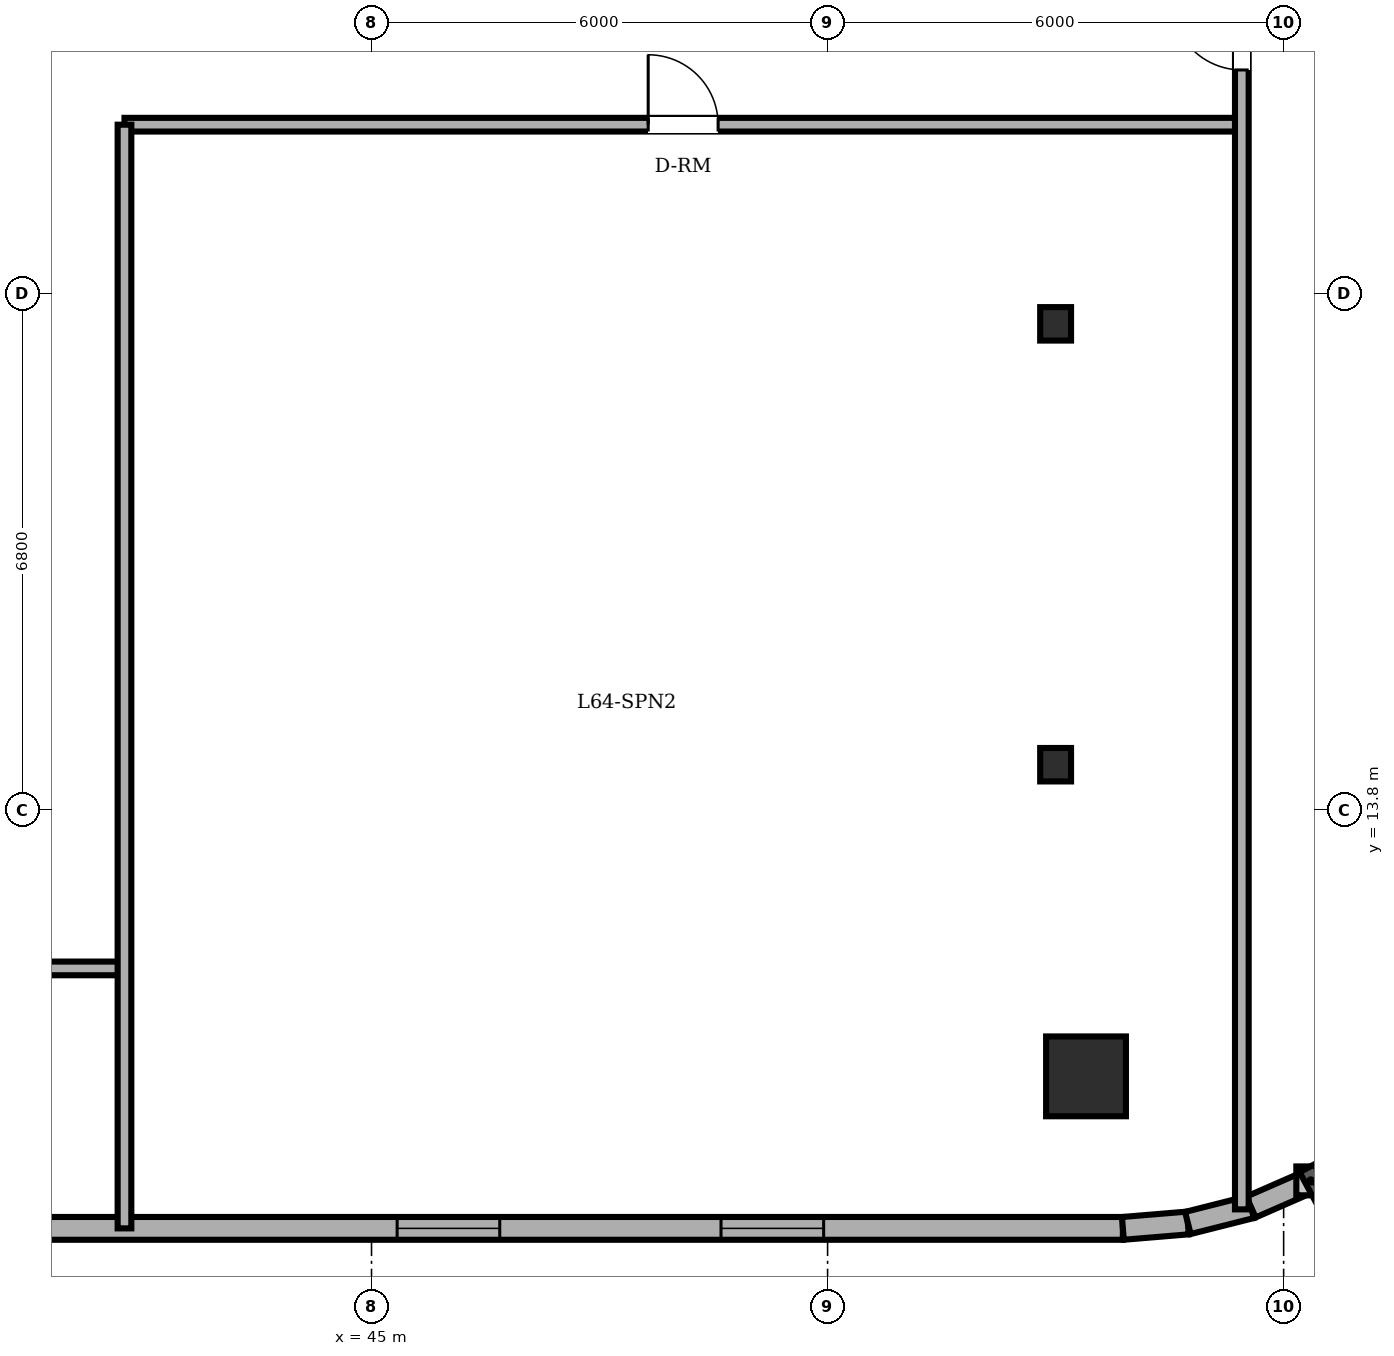
"""IFC4 building model, lengths in metres.
Left out: names, types, materials, properties, quantities, classifications, styles, units other than length and angle.
Written with IfcOpenShell. Run it as: python <this file> out.ifc"""

import sys

from ifc_helpers import new_model, si_unit, direction, frame, frame_2d, origin, origin_2d, place, context, subcontext, project, spatial, rectangle, circle, i_section, extrude, element, fill, save


model = new_model("IFC4")
c1 = context("Model", 3, precision=1e-05, world=origin(), true_north=direction((0.0, 1.0)))
c2 = subcontext(c1, "Body", "Model", "MODEL_VIEW")
j1 = project(units=[si_unit("LENGTHUNIT", "METRE"), si_unit("PLANEANGLEUNIT", "RADIAN")], contexts=[c1])
p1 = place(None, origin())
s1 = spatial("IfcSite", under=j1, at=p1, CompositionType="ELEMENT")
p2 = place(p1, origin())
s2 = spatial("IfcBuilding", under=s1, at=p2, CompositionType="ELEMENT")
p3 = place(p2, frame((0.0, 0.0, 244.5)))
s3 = spatial("IfcBuildingStorey", under=s2, at=p3, CompositionType="ELEMENT", Elevation=244.5)
p4 = place(p3, frame((54.4, 10.3, 0.0), z_axis=(0.0, 0.0, 1.0), x_axis=(1.0, 0.0, 0.0)))
e1 = element("IfcColumn", 1, at=p4, inside=s3, PredefinedType="COLUMN", context=c2, shape_type="SweptSolid", body=[
    extrude(circle(Radius=0.525, at=origin_2d()), origin(), (0.0, 0.0, 1.0), 3.6),
])
for number, where, z_axis, x_axis in (
    (2, (54.0, 14.4, 0.0), (0.0, 0.0, 1.0), (1.0, 0.0, 0.0)),
    (3, (54.0, 20.2, 0.0), (0.0, 0.0, 1.0), (1.0, 0.0, 0.0)),
):
    element("IfcColumn", number, at=place(p3, frame(where, z_axis=z_axis, x_axis=x_axis)), inside=s3, PredefinedType="COLUMN", context=c2, shape_type="SweptSolid", body=[
        extrude(i_section(OverallWidth=0.406, OverallDepth=0.44, WebThickness=0.024, FlangeThickness=0.039, FilletRadius=0.015, at=origin_2d()), origin(), (0.0, 0.0, 1.0), 3.6),
    ])
p5 = place(p3, frame((22.4, 8.3, 0.0), z_axis=(0.0, 0.0, 1.0), x_axis=(1.0, 0.0, 0.0)))
e4 = element("IfcWall", 4, at=p5, inside=s3, PredefinedType="SOLIDWALL", context=c2, shape_type="SweptSolid", body=[
    extrude(rectangle(XDim=32.485, YDim=0.3, at=frame_2d((16.243, 0.0))), origin(), (0.0, 0.0, 1.0), 3.36),
])
p6 = place(p5, frame((4.825, 0.0, 0.0)))
e5 = element("IfcOpeningElement", 5, at=p6, cuts=e4, PredefinedType="OPENING", context=c2, shape_type="SweptSolid", body=[
    extrude(rectangle(XDim=0.95, YDim=2.2, at=frame_2d((0.475, 1.1))), frame((0.0, 0.16, 0.0), z_axis=(0.0, -1.0, 0.0), x_axis=(1.0, 0.0, 0.0)), (0.0, 0.0, 1.0), 0.32),
])
p7 = place(p5, frame((1.3, 0.0, 0.85)))
e6 = element("IfcOpeningElement", 6, at=p7, cuts=e4, PredefinedType="OPENING", context=c2, shape_type="SweptSolid", body=[
    extrude(rectangle(XDim=1.35, YDim=1.55, at=frame_2d((0.675, 0.775))), frame((0.0, 0.16, 0.0), z_axis=(0.0, -1.0, 0.0), x_axis=(1.0, 0.0, 0.0)), (0.0, 0.0, 1.0), 0.32),
])
p8 = place(p5, frame((10.708, 0.0, 0.85)))
e7 = element("IfcOpeningElement", 7, at=p8, cuts=e4, PredefinedType="OPENING", context=c2, shape_type="SweptSolid", body=[
    extrude(rectangle(XDim=1.35, YDim=1.55, at=frame_2d((0.675, 0.775))), frame((0.0, 0.16, 0.0), z_axis=(0.0, -1.0, 0.0), x_axis=(1.0, 0.0, 0.0)), (0.0, 0.0, 1.0), 0.32),
])
p9 = place(p5, frame((14.692, 0.0, 0.85)))
e8 = element("IfcOpeningElement", 8, at=p9, cuts=e4, PredefinedType="OPENING", context=c2, shape_type="SweptSolid", body=[
    extrude(rectangle(XDim=1.35, YDim=1.55, at=frame_2d((0.675, 0.775))), frame((0.0, 0.16, 0.0), z_axis=(0.0, -1.0, 0.0), x_axis=(1.0, 0.0, 0.0)), (0.0, 0.0, 1.0), 0.32),
])
p10 = place(p5, frame((22.937, 0.0, 0.85)))
e9 = element("IfcOpeningElement", 9, at=p10, cuts=e4, PredefinedType="OPENING", context=c2, shape_type="SweptSolid", body=[
    extrude(rectangle(XDim=1.35, YDim=1.55, at=frame_2d((0.675, 0.775))), frame((0.0, 0.16, 0.0), z_axis=(0.0, -1.0, 0.0), x_axis=(1.0, 0.0, 0.0)), (0.0, 0.0, 1.0), 0.32),
])
p11 = place(p5, frame((27.198, 0.0, 0.85)))
e10 = element("IfcOpeningElement", 10, at=p11, cuts=e4, PredefinedType="OPENING", context=c2, shape_type="SweptSolid", body=[
    extrude(rectangle(XDim=1.35, YDim=1.55, at=frame_2d((0.675, 0.775))), frame((0.0, 0.16, 0.0), z_axis=(0.0, -1.0, 0.0), x_axis=(1.0, 0.0, 0.0)), (0.0, 0.0, 1.0), 0.32),
])
p12 = place(p3, frame((54.885, 8.3, 0.0), z_axis=(0.0, 0.0, 1.0), x_axis=(0.996565355958, 0.082809971041, 0.0)))
e11 = element("IfcWall", 11, at=p12, inside=s3, PredefinedType="SOLIDWALL", context=c2, shape_type="SweptSolid", body=[
    extrude(rectangle(XDim=0.858, YDim=0.3, at=frame_2d((0.429, 0.0))), origin(), (0.0, 0.0, 1.0), 3.36),
])
p13 = place(p3, frame((55.74, 8.371, 0.0), z_axis=(0.0, 0.0, 1.0), x_axis=(0.969536346338, 0.244947490555, 0.0)))
e12 = element("IfcWall", 12, at=p13, inside=s3, PredefinedType="SOLIDWALL", context=c2, shape_type="SweptSolid", body=[
    extrude(rectangle(XDim=0.857, YDim=0.3, at=frame_2d((0.429, 0.0))), origin(), (0.0, 0.0, 1.0), 3.36),
])
p14 = place(p3, frame((56.571, 8.581, 0.0), z_axis=(0.0, 0.0, 1.0), x_axis=(0.916085473636, 0.400983048261, 0.0)))
e13 = element("IfcWall", 13, at=p14, inside=s3, PredefinedType="SOLIDWALL", context=c2, shape_type="SweptSolid", body=[
    extrude(rectangle(XDim=0.858, YDim=0.3, at=frame_2d((0.429, 0.0))), origin(), (0.0, 0.0, 1.0), 3.36),
])
p15 = place(p3, frame((17.677, 11.72, 0.0), z_axis=(0.0, 0.0, 1.0), x_axis=(1.0, 0.0, 0.0)))
e14 = element("IfcWall", 14, at=p15, inside=s3, PredefinedType="PARTITIONING", context=c2, shape_type="SweptSolid", body=[
    extrude(rectangle(XDim=24.073, YDim=0.18, at=frame_2d((12.037, 0.0))), origin(), (0.0, 0.0, 1.0), 3.36),
])
p16 = place(p15, frame((9.763, 0.0, 0.0)))
e15 = element("IfcOpeningElement", 15, at=p16, cuts=e14, PredefinedType="OPENING", context=c2, shape_type="SweptSolid", body=[
    extrude(rectangle(XDim=0.92, YDim=2.1, at=frame_2d((0.46, 1.05))), frame((0.0, 0.1, 0.0), z_axis=(0.0, -1.0, 0.0), x_axis=(1.0, 0.0, 0.0)), (0.0, 0.0, 1.0), 0.2),
])
p17 = place(p15, frame((4.063, 0.0, 0.0)))
e16 = element("IfcOpeningElement", 16, at=p17, cuts=e14, PredefinedType="OPENING", context=c2, shape_type="SweptSolid", body=[
    extrude(rectangle(XDim=0.92, YDim=2.1, at=frame_2d((0.46, 1.05))), frame((0.0, 0.1, 0.0), z_axis=(0.0, -1.0, 0.0), x_axis=(1.0, 0.0, 0.0)), (0.0, 0.0, 1.0), 0.2),
])
p18 = place(p15, frame((17.378, 0.0, 0.0)))
e17 = element("IfcOpeningElement", 17, at=p18, cuts=e14, PredefinedType="OPENING", context=c2, shape_type="SweptSolid", body=[
    extrude(rectangle(XDim=0.92, YDim=2.1, at=frame_2d((0.46, 1.05))), frame((0.0, 0.1, 0.0), z_axis=(0.0, -1.0, 0.0), x_axis=(1.0, 0.0, 0.0)), (0.0, 0.0, 1.0), 0.2),
])
p19 = place(p3, frame((41.75, 22.82, 0.0), z_axis=(0.0, 0.0, 1.0), x_axis=(1.0, 0.0, 0.0)))
e18 = element("IfcWall", 18, at=p19, inside=s3, PredefinedType="PARTITIONING", context=c2, shape_type="SweptSolid", body=[
    extrude(rectangle(XDim=14.7, YDim=0.18, at=frame_2d((7.35, 0.0))), origin(), (0.0, 0.0, 1.0), 3.36),
])
p20 = place(p19, frame((6.89, 0.0, 0.0)))
e19 = element("IfcOpeningElement", 19, at=p20, cuts=e18, PredefinedType="OPENING", context=c2, shape_type="SweptSolid", body=[
    extrude(rectangle(XDim=0.92, YDim=2.1, at=frame_2d((0.46, 1.05))), frame((0.0, 0.1, 0.0), z_axis=(0.0, -1.0, 0.0), x_axis=(1.0, 0.0, 0.0)), (0.0, 0.0, 1.0), 0.2),
])
p21 = place(p3, frame((41.75, 8.3, 0.0), z_axis=(0.0, 0.0, 1.0), x_axis=(0.0, 1.0, 0.0)))
e20 = element("IfcWall", 20, at=p21, inside=s3, PredefinedType="PARTITIONING", context=c2, shape_type="SweptSolid", body=[
    extrude(rectangle(XDim=14.52, YDim=0.18, at=frame_2d((7.26, 0.0))), origin(), (0.0, 0.0, 1.0), 3.36),
])
p22 = place(p3, frame((56.45, 8.55, 0.0), z_axis=(0.0, 0.0, 1.0), x_axis=(0.0, 1.0, 0.0)))
e21 = element("IfcWall", 21, at=p22, inside=s3, PredefinedType="PARTITIONING", context=c2, shape_type="SweptSolid", body=[
    extrude(rectangle(XDim=30.9, YDim=0.18, at=frame_2d((15.45, 0.0))), origin(), (0.0, 0.0, 1.0), 3.36),
])
p23 = place(p22, frame((14.99, 0.0, 0.0)))
e22 = element("IfcOpeningElement", 22, at=p23, cuts=e21, PredefinedType="OPENING", context=c2, shape_type="SweptSolid", body=[
    extrude(rectangle(XDim=0.92, YDim=2.1, at=frame_2d((0.46, 1.05))), frame((0.0, 0.1, 0.0), z_axis=(0.0, -1.0, 0.0), x_axis=(1.0, 0.0, 0.0)), (0.0, 0.0, 1.0), 0.2),
])
p24 = place(p10, origin())
e23 = element("IfcWindow", 23, at=p24, inside=s3, PartitioningType="SINGLE_PANEL", PredefinedType="WINDOW", context=c2, shape_type="SweptSolid", body=[
    extrude(rectangle(XDim=1.35, YDim=1.55, at=frame_2d((0.675, 0.775))), frame((0.0, 0.03, 0.0), z_axis=(0.0, -1.0, 0.0), x_axis=(1.0, 0.0, 0.0)), (0.0, 0.0, 1.0), 0.06),
])
fill(e9, e23)
p25 = place(p11, origin())
e24 = element("IfcWindow", 24, at=p25, inside=s3, PartitioningType="SINGLE_PANEL", PredefinedType="WINDOW", context=c2, shape_type="SweptSolid", body=[
    extrude(rectangle(XDim=1.35, YDim=1.55, at=frame_2d((0.675, 0.775))), frame((0.0, 0.03, 0.0), z_axis=(0.0, -1.0, 0.0), x_axis=(1.0, 0.0, 0.0)), (0.0, 0.0, 1.0), 0.06),
])
fill(e10, e24)
p26 = place(p20, origin())
e25 = element("IfcDoor", 25, at=p26, inside=s3, OperationType="SINGLE_SWING_LEFT", PredefinedType="DOOR", context=c2, shape_type="SweptSolid", body=[
    extrude(rectangle(XDim=0.92, YDim=2.1, at=frame_2d((0.46, 1.05))), frame((0.0, 0.025, 0.0), z_axis=(0.0, -1.0, 0.0), x_axis=(1.0, 0.0, 0.0)), (0.0, 0.0, 1.0), 0.05),
])
fill(e19, e25)
p27 = place(p23, origin())
e26 = element("IfcDoor", 26, at=p27, inside=s3, OperationType="SINGLE_SWING_RIGHT", PredefinedType="DOOR", context=c2, shape_type="SweptSolid", body=[
    extrude(rectangle(XDim=0.92, YDim=2.1, at=frame_2d((0.46, 1.05))), frame((0.0, 0.025, 0.0), z_axis=(0.0, -1.0, 0.0), x_axis=(1.0, 0.0, 0.0)), (0.0, 0.0, 1.0), 0.05),
])
fill(e22, e26)
save(model, sys.argv[1])
